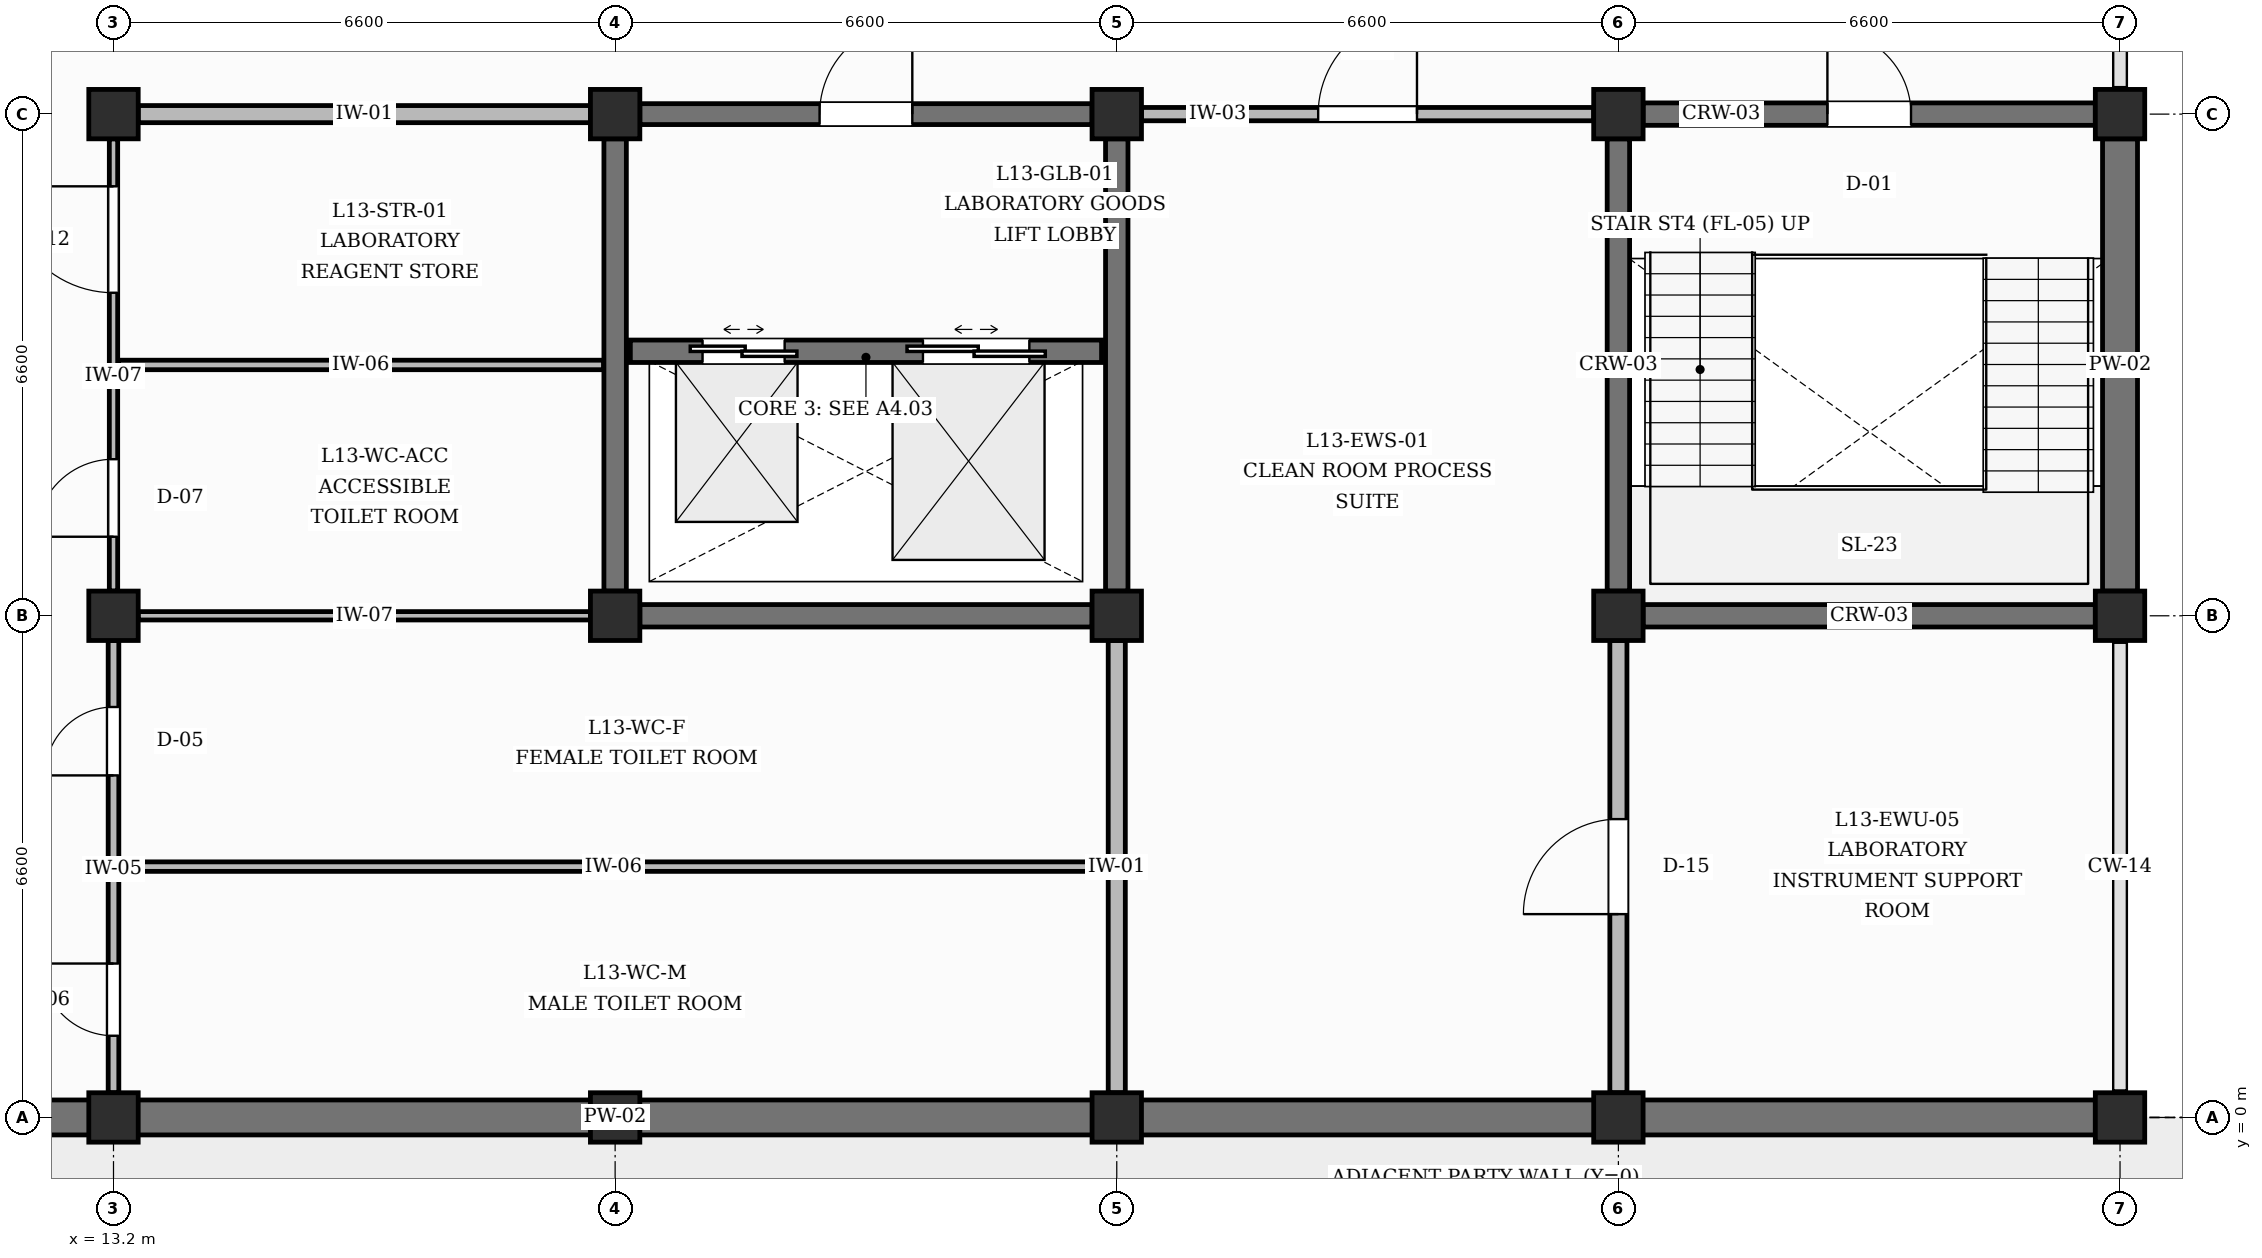
"""IFC4 building model, lengths in metres.
Left out: names, types, materials, properties, quantities, classifications, styles, units other than length and angle.
Written with IfcOpenShell. Run it as: python <this file> out.ifc"""

import sys

from ifc_helpers import new_model, si_unit, direction, frame, frame_2d, origin, origin_2d, place, context, subcontext, project, spatial, rectangle, extrude, element, fill, save


model = new_model("IFC4")
c1 = context("Model", 3, precision=1e-05, world=origin(), true_north=direction((0.0, 1.0)))
c2 = subcontext(c1, "Body", "Model", "MODEL_VIEW")
j1 = project(units=[si_unit("LENGTHUNIT", "METRE"), si_unit("PLANEANGLEUNIT", "RADIAN")], contexts=[c1])
p1 = place(None, origin())
s1 = spatial("IfcSite", under=j1, at=p1, CompositionType="ELEMENT")
p2 = place(p1, origin())
s2 = spatial("IfcBuilding", under=s1, at=p2, CompositionType="ELEMENT")
p3 = place(p2, frame((0.0, 0.0, 56.4)))
s3 = spatial("IfcBuildingStorey", under=s2, at=p3, CompositionType="ELEMENT", Elevation=56.4)
for number, where, z_axis, x_axis in (
    (1, (13.2, 0.0, 0.0), (0.0, 0.0, 1.0), (1.0, 0.0, 0.0)),
    (2, (13.2, 6.6, 0.0), (0.0, 0.0, 1.0), (1.0, 0.0, 0.0)),
    (3, (13.2, 13.2, 0.0), (0.0, 0.0, 1.0), (1.0, 0.0, 0.0)),
    (4, (19.8, 0.0, 0.0), (0.0, 0.0, 1.0), (1.0, 0.0, 0.0)),
    (5, (19.8, 6.6, 0.0), (0.0, 0.0, 1.0), (1.0, 0.0, 0.0)),
    (6, (19.8, 13.2, 0.0), (0.0, 0.0, 1.0), (1.0, 0.0, 0.0)),
    (7, (26.4, 0.0, 0.0), (0.0, 0.0, 1.0), (1.0, 0.0, 0.0)),
    (8, (26.4, 6.6, 0.0), (0.0, 0.0, 1.0), (1.0, 0.0, 0.0)),
    (9, (26.4, 13.2, 0.0), (0.0, 0.0, 1.0), (1.0, 0.0, 0.0)),
    (10, (33.0, 0.0, 0.0), (0.0, 0.0, 1.0), (1.0, 0.0, 0.0)),
    (11, (33.0, 6.6, 0.0), (0.0, 0.0, 1.0), (1.0, 0.0, 0.0)),
    (12, (33.0, 13.2, 0.0), (0.0, 0.0, 1.0), (1.0, 0.0, 0.0)),
    (13, (39.6, 0.0, 0.0), (0.0, 0.0, 1.0), (1.0, 0.0, 0.0)),
    (14, (39.6, 6.6, 0.0), (0.0, 0.0, 1.0), (1.0, 0.0, 0.0)),
    (15, (39.6, 13.2, 0.0), (0.0, 0.0, 1.0), (1.0, 0.0, 0.0)),
):
    element("IfcColumn", number, at=place(p3, frame(where, z_axis=z_axis, x_axis=x_axis)), inside=s3, PredefinedType="COLUMN", context=c2, shape_type="SweptSolid", body=[
        extrude(rectangle(XDim=0.65, YDim=0.65, at=origin_2d()), origin(), (0.0, 0.0, 1.0), 4.2),
    ])
p4 = place(p3, frame((6.925, 0.0, 0.0), z_axis=(0.0, 0.0, 1.0), x_axis=(1.0, 0.0, 0.0)))
e16 = element("IfcWall", 16, at=p4, inside=s3, PredefinedType="SOLIDWALL", context=c2, shape_type="SweptSolid", body=[
    extrude(rectangle(XDim=5.95, YDim=0.46, at=frame_2d((2.975, 0.0))), origin(), (0.0, 0.0, 1.0), 3.3),
])
p5 = place(p3, frame((13.525, 0.0, 0.0), z_axis=(0.0, 0.0, 1.0), x_axis=(1.0, 0.0, 0.0)))
e17 = element("IfcWall", 17, at=p5, inside=s3, PredefinedType="SOLIDWALL", context=c2, shape_type="SweptSolid", body=[
    extrude(rectangle(XDim=5.95, YDim=0.46, at=frame_2d((2.975, 0.0))), origin(), (0.0, 0.0, 1.0), 3.3),
])
for number, where, z_axis, x_axis in (
    (18, (20.125, 0.0, 0.0), (0.0, 0.0, 1.0), (1.0, 0.0, 0.0)),
    (19, (26.725, 0.0, 0.0), (0.0, 0.0, 1.0), (1.0, 0.0, 0.0)),
    (20, (33.325, 0.0, 0.0), (0.0, 0.0, 1.0), (1.0, 0.0, 0.0)),
    (21, (39.6, 6.925, 0.0), (0.0, 0.0, 1.0), (0.0, 1.0, 0.0)),
):
    element("IfcWall", number, at=place(p3, frame(where, z_axis=z_axis, x_axis=x_axis)), inside=s3, PredefinedType="SOLIDWALL", context=c2, shape_type="SweptSolid", body=[
        extrude(rectangle(XDim=5.95, YDim=0.46, at=frame_2d((2.975, 0.0))), origin(), (0.0, 0.0, 1.0), 3.3),
    ])
p6 = place(p3, frame((33.325, 6.6, 0.0), z_axis=(0.0, 0.0, 1.0), x_axis=(1.0, 0.0, 0.0)))
e22 = element("IfcWall", 22, at=p6, inside=s3, PredefinedType="SHEAR", context=c2, shape_type="SweptSolid", body=[
    extrude(rectangle(XDim=5.95, YDim=0.295, at=frame_2d((2.975, 0.0))), origin(), (0.0, 0.0, 1.0), 3.3),
])
p7 = place(p3, frame((33.325, 13.2, 0.0), z_axis=(0.0, 0.0, 1.0), x_axis=(1.0, 0.0, 0.0)))
e23 = element("IfcWall", 23, at=p7, inside=s3, PredefinedType="SHEAR", context=c2, shape_type="SweptSolid", body=[
    extrude(rectangle(XDim=5.95, YDim=0.295, at=frame_2d((2.975, 0.0))), origin(), (0.0, 0.0, 1.0), 3.3),
])
p8 = place(p7, frame((2.425, 0.0, 0.0)))
e24 = element("IfcOpeningElement", 24, at=p8, cuts=e23, PredefinedType="OPENING", context=c2, shape_type="SweptSolid", body=[
    extrude(rectangle(XDim=1.1, YDim=2.15, at=frame_2d((0.55, 1.075))), frame((0.0, 0.157, 0.0), z_axis=(0.0, -1.0, 0.0), x_axis=(1.0, 0.0, 0.0)), (0.0, 0.0, 1.0), 0.315),
])
for number, where, z_axis, x_axis in (
    (25, (33.0, 6.925, 0.0), (0.0, 0.0, 1.0), (0.0, 1.0, 0.0)),
    (26, (20.125, 6.6, 0.0), (0.0, 0.0, 1.0), (1.0, 0.0, 0.0)),
    (27, (19.8, 6.925, 0.0), (0.0, 0.0, 1.0), (0.0, 1.0, 0.0)),
    (28, (26.4, 6.925, 0.0), (0.0, 0.0, 1.0), (0.0, 1.0, 0.0)),
):
    element("IfcWall", number, at=place(p3, frame(where, z_axis=z_axis, x_axis=x_axis)), inside=s3, PredefinedType="SHEAR", context=c2, shape_type="SweptSolid", body=[
        extrude(rectangle(XDim=5.95, YDim=0.295, at=frame_2d((2.975, 0.0))), origin(), (0.0, 0.0, 1.0), 3.3),
    ])
p9 = place(p3, frame((20.125, 13.2, 0.0), z_axis=(0.0, 0.0, 1.0), x_axis=(1.0, 0.0, 0.0)))
e29 = element("IfcWall", 29, at=p9, inside=s3, PredefinedType="SHEAR", context=c2, shape_type="SweptSolid", body=[
    extrude(rectangle(XDim=5.95, YDim=0.275, at=frame_2d((2.975, 0.0))), origin(), (0.0, 0.0, 1.0), 3.3),
])
p10 = place(p9, frame((2.365, 0.0, 0.0)))
e30 = element("IfcOpeningElement", 30, at=p10, cuts=e29, PredefinedType="OPENING", context=c2, shape_type="SweptSolid", body=[
    extrude(rectangle(XDim=1.22, YDim=2.15, at=frame_2d((0.61, 1.075))), frame((0.0, 0.147, 0.0), z_axis=(0.0, -1.0, 0.0), x_axis=(1.0, 0.0, 0.0)), (0.0, 0.0, 1.0), 0.295),
])
p11 = place(p3, frame((20.0, 10.08, 0.0), z_axis=(0.0, 0.0, 1.0), x_axis=(1.0, 0.0, 0.0)))
e31 = element("IfcWall", 31, at=p11, inside=s3, PredefinedType="SHEAR", context=c2, shape_type="SweptSolid", body=[
    extrude(rectangle(XDim=6.2, YDim=0.295, at=frame_2d((3.1, 0.0))), origin(), (0.0, 0.0, 1.0), 3.9),
])
p12 = place(p11, frame((0.95, 0.0, 0.0)))
e32 = element("IfcOpeningElement", 32, at=p12, cuts=e31, PredefinedType="OPENING", context=c2, shape_type="SweptSolid", body=[
    extrude(rectangle(XDim=1.08, YDim=2.15, at=frame_2d((0.54, 1.075))), frame((0.0, 0.157, 0.0), z_axis=(0.0, -1.0, 0.0), x_axis=(1.0, 0.0, 0.0)), (0.0, 0.0, 1.0), 0.315),
])
p13 = place(p11, frame((3.85, 0.0, 0.0)))
e33 = element("IfcOpeningElement", 33, at=p13, cuts=e31, PredefinedType="OPENING", context=c2, shape_type="SweptSolid", body=[
    extrude(rectangle(XDim=1.4, YDim=2.35, at=frame_2d((0.7, 1.175))), frame((0.0, 0.157, 0.0), z_axis=(0.0, -1.0, 0.0), x_axis=(1.0, 0.0, 0.0)), (0.0, 0.0, 1.0), 0.315),
])
p14 = place(p3, frame((13.2, 0.325, 0.0), z_axis=(0.0, 0.0, 1.0), x_axis=(0.0, 1.0, 0.0)))
e34 = element("IfcWall", 34, at=p14, inside=s3, PredefinedType="PARTITIONING", context=c2, shape_type="SweptSolid", body=[
    extrude(rectangle(XDim=5.95, YDim=0.14, at=frame_2d((2.975, 0.0))), origin(), (0.0, 0.0, 1.0), 3.3),
])
p15 = place(p14, frame((0.75, 0.0, 0.0)))
e35 = element("IfcOpeningElement", 35, at=p15, cuts=e34, PredefinedType="OPENING", context=c2, shape_type="SweptSolid", body=[
    extrude(rectangle(XDim=0.95, YDim=2.1, at=frame_2d((0.475, 1.05))), frame((0.0, 0.08, 0.0), z_axis=(0.0, -1.0, 0.0), x_axis=(1.0, 0.0, 0.0)), (0.0, 0.0, 1.0), 0.16),
])
p16 = place(p14, frame((4.175, 0.0, 0.0)))
e36 = element("IfcOpeningElement", 36, at=p16, cuts=e34, PredefinedType="OPENING", context=c2, shape_type="SweptSolid", body=[
    extrude(rectangle(XDim=0.9, YDim=2.1, at=frame_2d((0.45, 1.05))), frame((0.0, 0.08, 0.0), z_axis=(0.0, -1.0, 0.0), x_axis=(1.0, 0.0, 0.0)), (0.0, 0.0, 1.0), 0.16),
])
p17 = place(p3, frame((26.4, 0.325, 0.0), z_axis=(0.0, 0.0, 1.0), x_axis=(0.0, 1.0, 0.0)))
e37 = element("IfcWall", 37, at=p17, inside=s3, PredefinedType="PARTITIONING", context=c2, shape_type="SweptSolid", body=[
    extrude(rectangle(XDim=5.95, YDim=0.225, at=frame_2d((2.975, 0.0))), origin(), (0.0, 0.0, 1.0), 3.3),
])
p18 = place(p3, frame((13.525, 6.6, 0.0), z_axis=(0.0, 0.0, 1.0), x_axis=(1.0, 0.0, 0.0)))
e38 = element("IfcWall", 38, at=p18, inside=s3, PredefinedType="PARTITIONING", context=c2, shape_type="SweptSolid", body=[
    extrude(rectangle(XDim=5.95, YDim=0.11, at=frame_2d((2.975, 0.0))), origin(), (0.0, 0.0, 1.0), 3.3),
])
p19 = place(p3, frame((13.2, 6.925, 0.0), z_axis=(0.0, 0.0, 1.0), x_axis=(0.0, 1.0, 0.0)))
e39 = element("IfcWall", 39, at=p19, inside=s3, PredefinedType="PARTITIONING", context=c2, shape_type="SweptSolid", body=[
    extrude(rectangle(XDim=5.95, YDim=0.11, at=frame_2d((2.975, 0.0))), origin(), (0.0, 0.0, 1.0), 3.3),
])
p20 = place(p19, frame((0.715, 0.0, 0.0)))
e40 = element("IfcOpeningElement", 40, at=p20, cuts=e39, PredefinedType="OPENING", context=c2, shape_type="SweptSolid", body=[
    extrude(rectangle(XDim=1.02, YDim=2.15, at=frame_2d((0.51, 1.075))), frame((0.0, 0.065, 0.0), z_axis=(0.0, -1.0, 0.0), x_axis=(1.0, 0.0, 0.0)), (0.0, 0.0, 1.0), 0.13),
])
p21 = place(p19, frame((3.925, 0.0, 0.0)))
e41 = element("IfcOpeningElement", 41, at=p21, cuts=e39, PredefinedType="OPENING", context=c2, shape_type="SweptSolid", body=[
    extrude(rectangle(XDim=1.4, YDim=2.25, at=frame_2d((0.7, 1.125))), frame((0.0, 0.065, 0.0), z_axis=(0.0, -1.0, 0.0), x_axis=(1.0, 0.0, 0.0)), (0.0, 0.0, 1.0), 0.13),
])
p22 = place(p3, frame((13.525, 13.2, 0.0), z_axis=(0.0, 0.0, 1.0), x_axis=(1.0, 0.0, 0.0)))
e42 = element("IfcWall", 42, at=p22, inside=s3, PredefinedType="PARTITIONING", context=c2, shape_type="SweptSolid", body=[
    extrude(rectangle(XDim=5.95, YDim=0.225, at=frame_2d((2.975, 0.0))), origin(), (0.0, 0.0, 1.0), 3.3),
])
p23 = place(p3, frame((33.0, 0.325, 0.0), z_axis=(0.0, 0.0, 1.0), x_axis=(0.0, 1.0, 0.0)))
e43 = element("IfcWall", 43, at=p23, inside=s3, PredefinedType="PARTITIONING", context=c2, shape_type="SweptSolid", body=[
    extrude(rectangle(XDim=5.95, YDim=0.225, at=frame_2d((2.975, 0.0))), origin(), (0.0, 0.0, 1.0), 3.3),
])
p24 = place(p23, frame((2.35, 0.0, 0.0)))
e44 = element("IfcOpeningElement", 44, at=p24, cuts=e43, PredefinedType="OPENING", context=c2, shape_type="SweptSolid", body=[
    extrude(rectangle(XDim=1.25, YDim=2.25, at=frame_2d((0.625, 1.125))), frame((0.0, 0.123, 0.0), z_axis=(0.0, -1.0, 0.0), x_axis=(1.0, 0.0, 0.0)), (0.0, 0.0, 1.0), 0.245),
])
p25 = place(p3, frame((26.725, 13.2, 0.0), z_axis=(0.0, 0.0, 1.0), x_axis=(1.0, 0.0, 0.0)))
e45 = element("IfcWall", 45, at=p25, inside=s3, PredefinedType="PARTITIONING", context=c2, shape_type="SweptSolid", body=[
    extrude(rectangle(XDim=5.95, YDim=0.175, at=frame_2d((2.975, 0.0))), origin(), (0.0, 0.0, 1.0), 3.3),
])
p26 = place(p25, frame((2.325, 0.0, 0.0)))
e46 = element("IfcOpeningElement", 46, at=p26, cuts=e45, PredefinedType="OPENING", context=c2, shape_type="SweptSolid", body=[
    extrude(rectangle(XDim=1.3, YDim=2.3, at=frame_2d((0.65, 1.15))), frame((0.0, 0.097, 0.0), z_axis=(0.0, -1.0, 0.0), x_axis=(1.0, 0.0, 0.0)), (0.0, 0.0, 1.0), 0.195),
])
p27 = place(p3, frame((13.275, 3.3, 0.0), z_axis=(0.0, 0.0, 1.0), x_axis=(1.0, 0.0, 0.0)))
e47 = element("IfcWall", 47, at=p27, inside=s3, PredefinedType="PARTITIONING", context=c2, shape_type="SweptSolid", body=[
    extrude(rectangle(XDim=13.008, YDim=0.125, at=frame_2d((6.504, 0.0))), origin(), (0.0, 0.0, 1.0), 3.9),
])
p28 = place(p3, frame((13.26, 9.9, 0.0), z_axis=(0.0, 0.0, 1.0), x_axis=(1.0, 0.0, 0.0)))
e48 = element("IfcWall", 48, at=p28, inside=s3, PredefinedType="PARTITIONING", context=c2, shape_type="SweptSolid", body=[
    extrude(rectangle(XDim=6.387, YDim=0.125, at=frame_2d((3.194, 0.0))), origin(), (0.0, 0.0, 1.0), 3.9),
])
p29 = place(p8, origin())
e49 = element("IfcDoor", 49, at=p29, inside=s3, OperationType="SINGLE_SWING_LEFT", PredefinedType="DOOR", context=c2, shape_type="SweptSolid", body=[
    extrude(rectangle(XDim=1.1, YDim=2.15, at=frame_2d((0.55, 1.075))), frame((0.0, 0.025, 0.0), z_axis=(0.0, -1.0, 0.0), x_axis=(1.0, 0.0, 0.0)), (0.0, 0.0, 1.0), 0.05),
])
fill(e24, e49)
p30 = place(p12, origin())
e50 = element("IfcDoor", 50, at=p30, inside=s3, OperationType="DOUBLE_DOOR_SLIDING", PredefinedType="USERDEFINED", context=c2, shape_type="SweptSolid", body=[
    extrude(rectangle(XDim=1.08, YDim=2.15, at=frame_2d((0.54, 1.075))), frame((0.0, 0.025, 0.0), z_axis=(0.0, -1.0, 0.0), x_axis=(1.0, 0.0, 0.0)), (0.0, 0.0, 1.0), 0.05),
])
fill(e32, e50)
p31 = place(p13, origin())
e51 = element("IfcDoor", 51, at=p31, inside=s3, OperationType="DOUBLE_DOOR_SLIDING", PredefinedType="USERDEFINED", context=c2, shape_type="SweptSolid", body=[
    extrude(rectangle(XDim=1.4, YDim=2.35, at=frame_2d((0.7, 1.175))), frame((0.0, 0.025, 0.0), z_axis=(0.0, -1.0, 0.0), x_axis=(1.0, 0.0, 0.0)), (0.0, 0.0, 1.0), 0.05),
])
fill(e33, e51)
p32 = place(p10, origin())
e52 = element("IfcDoor", 52, at=p32, inside=s3, OperationType="SINGLE_SWING_RIGHT", PredefinedType="DOOR", context=c2, shape_type="SweptSolid", body=[
    extrude(rectangle(XDim=1.22, YDim=2.15, at=frame_2d((0.61, 1.075))), frame((0.0, 0.025, 0.0), z_axis=(0.0, -1.0, 0.0), x_axis=(1.0, 0.0, 0.0)), (0.0, 0.0, 1.0), 0.05),
])
fill(e30, e52)
p33 = place(p15, origin())
e53 = element("IfcDoor", 53, at=p33, inside=s3, OperationType="SINGLE_SWING_RIGHT", PredefinedType="DOOR", context=c2, shape_type="SweptSolid", body=[
    extrude(rectangle(XDim=0.95, YDim=2.1, at=frame_2d((0.475, 1.05))), frame((0.0, 0.025, 0.0), z_axis=(0.0, -1.0, 0.0), x_axis=(1.0, 0.0, 0.0)), (0.0, 0.0, 1.0), 0.05),
])
fill(e35, e53)
p34 = place(p16, origin())
e54 = element("IfcDoor", 54, at=p34, inside=s3, OperationType="SINGLE_SWING_LEFT", PredefinedType="DOOR", context=c2, shape_type="SweptSolid", body=[
    extrude(rectangle(XDim=0.9, YDim=2.1, at=frame_2d((0.45, 1.05))), frame((0.0, 0.025, 0.0), z_axis=(0.0, -1.0, 0.0), x_axis=(1.0, 0.0, 0.0)), (0.0, 0.0, 1.0), 0.05),
])
fill(e36, e54)
p35 = place(p20, origin())
e55 = element("IfcDoor", 55, at=p35, inside=s3, OperationType="SINGLE_SWING_LEFT", PredefinedType="DOOR", context=c2, shape_type="SweptSolid", body=[
    extrude(rectangle(XDim=1.02, YDim=2.15, at=frame_2d((0.51, 1.075))), frame((0.0, 0.025, 0.0), z_axis=(0.0, -1.0, 0.0), x_axis=(1.0, 0.0, 0.0)), (0.0, 0.0, 1.0), 0.05),
])
fill(e40, e55)
p36 = place(p21, origin())
e56 = element("IfcDoor", 56, at=p36, inside=s3, OperationType="SINGLE_SWING_RIGHT", PredefinedType="DOOR", context=c2, shape_type="SweptSolid", body=[
    extrude(rectangle(XDim=1.4, YDim=2.25, at=frame_2d((0.7, 1.125))), frame((0.0, 0.025, 0.0), z_axis=(0.0, -1.0, 0.0), x_axis=(1.0, 0.0, 0.0)), (0.0, 0.0, 1.0), 0.05),
])
fill(e41, e56)
p37 = place(p26, origin())
e57 = element("IfcDoor", 57, at=p37, inside=s3, OperationType="SINGLE_SWING_RIGHT", PredefinedType="DOOR", context=c2, shape_type="SweptSolid", body=[
    extrude(rectangle(XDim=1.3, YDim=2.3, at=frame_2d((0.65, 1.15))), frame((0.0, 0.025, 0.0), z_axis=(0.0, -1.0, 0.0), x_axis=(1.0, 0.0, 0.0)), (0.0, 0.0, 1.0), 0.05),
])
fill(e46, e57)
p38 = place(p24, origin())
e58 = element("IfcDoor", 58, at=p38, inside=s3, OperationType="SINGLE_SWING_LEFT", PredefinedType="DOOR", context=c2, shape_type="SweptSolid", body=[
    extrude(rectangle(XDim=1.25, YDim=2.25, at=frame_2d((0.625, 1.125))), frame((0.0, 0.025, 0.0), z_axis=(0.0, -1.0, 0.0), x_axis=(1.0, 0.0, 0.0)), (0.0, 0.0, 1.0), 0.05),
])
fill(e44, e58)
save(model, sys.argv[1])
